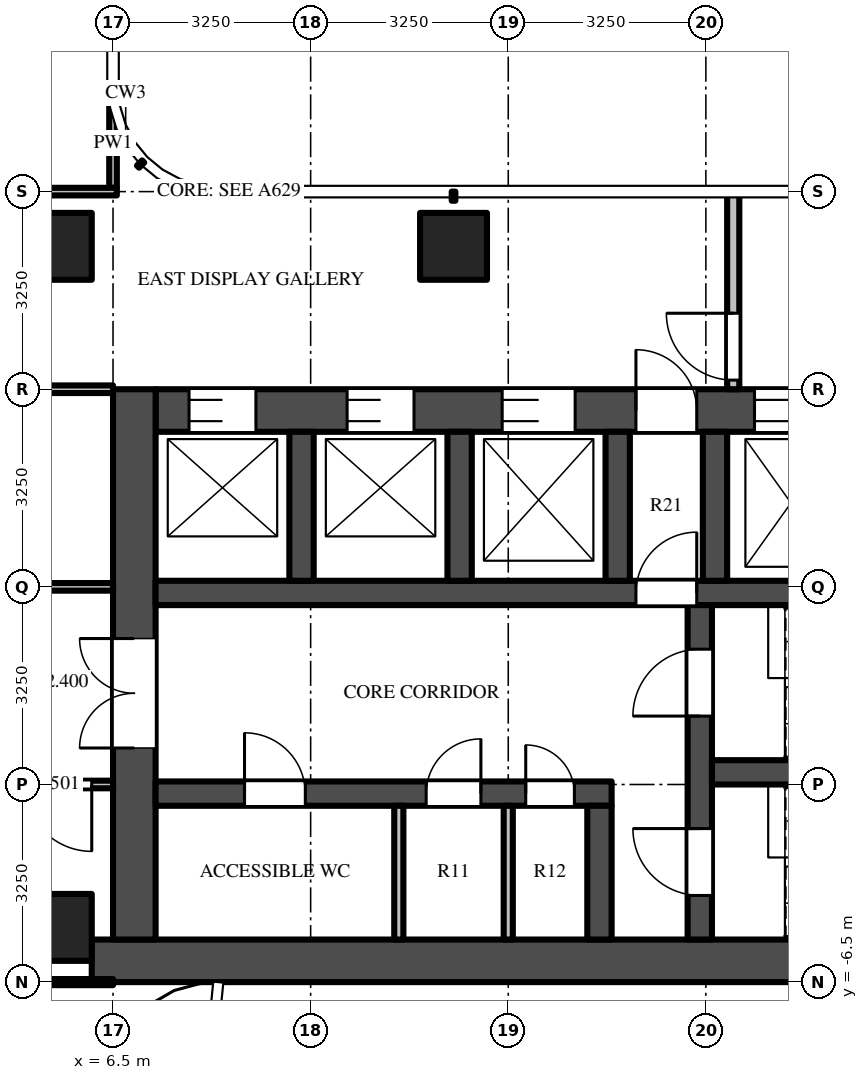
"""IFC4 building model, lengths in metres.
Left out: names, types, materials, properties, quantities, classifications, styles, units other than length and angle.
Written with IfcOpenShell. Run it as: python <this file> out.ifc"""

import sys

from ifc_helpers import new_model, si_unit, direction, frame, frame_2d, origin, origin_2d, place, context, subcontext, project, spatial, rectangle, extrude, source, transform, mapped, element, fill, save


model = new_model("IFC4")
c1 = context("Model", 3, precision=1e-05, world=origin(), true_north=direction((0.0, 1.0)))
c2 = subcontext(c1, "Body", "Model", "MODEL_VIEW")
j1 = project(units=[si_unit("LENGTHUNIT", "METRE"), si_unit("PLANEANGLEUNIT", "RADIAN")], contexts=[c1])
p1 = place(None, origin())
s1 = spatial("IfcSite", under=j1, at=p1, CompositionType="ELEMENT")
p2 = place(p1, origin())
s2 = spatial("IfcBuilding", under=s1, at=p2, CompositionType="ELEMENT")
p3 = place(p2, frame((0.0, 0.0, 232.4)))
s3 = spatial("IfcBuildingStorey", under=s2, at=p3, CompositionType="ELEMENT", Elevation=232.4)
m1 = source(origin(), c2, "Body", "SweptSolid", [
    extrude(rectangle(XDim=1.1, YDim=1.1, at=origin_2d()), origin(), (0.0, 0.0, 1.0), 3.9),
])
for number, where, z_axis, x_axis in (
    (1, (12.1, 5.6, 0.0), (0.0, 0.0, 1.0), (1.0, 0.0, 0.0)),
    (2, (5.6, 5.6, 0.0), (0.0, 0.0, 1.0), (1.0, 0.0, 0.0)),
    (3, (5.6, -5.6, 0.0), (0.0, 0.0, 1.0), (1.0, 0.0, 0.0)),
):
    element("IfcColumn", number, at=place(p3, frame(where, z_axis=z_axis, x_axis=x_axis)), inside=s3, PredefinedType="COLUMN", context=c2, shape_type="MappedRepresentation", body=[
        mapped(m1, transform((0.0, 0.0, 0.0))),
    ])
m2 = source(origin(), c2, "Body", "SweptSolid", [
    extrude(rectangle(XDim=16.6, YDim=0.7, at=frame_2d((8.3, 0.0))), origin(), (0.0, 0.0, 1.0), 3.7),
])
p4 = place(p3, frame((6.15, -6.15, 0.0), z_axis=(0.0, 0.0, 1.0), x_axis=(1.0, 0.0, 0.0)))
e4 = element("IfcWall", 4, at=p4, inside=s3, PredefinedType="SHEAR", context=c2, shape_type="MappedRepresentation", body=[
    mapped(m2, transform((0.0, 0.0, 0.0))),
])
m3 = source(origin(), c2, "Body", "SweptSolid", [
    extrude(rectangle(XDim=14.85, YDim=0.7, at=frame_2d((7.425, 0.0))), origin(), (0.0, 0.0, 1.0), 3.7),
])
p5 = place(p3, frame((7.2, 2.9, 0.0), z_axis=(0.0, 0.0, 1.0), x_axis=(1.0, 0.0, 0.0)))
e5 = element("IfcWall", 5, at=p5, inside=s3, PredefinedType="SHEAR", context=c2, shape_type="MappedRepresentation", body=[
    mapped(m3, transform((0.0, 0.0, 0.0))),
])
m4 = source(origin(), c2, "Body", "SweptSolid", [
    extrude(rectangle(XDim=1.1, YDim=2.1, at=frame_2d((0.55, 1.05))), frame((0.0, 0.36, 0.0), z_axis=(0.0, -1.0, 0.0), x_axis=(1.0, 0.0, 0.0)), (0.0, 0.0, 1.0), 0.72),
])
p6 = place(p5, frame((0.55, 0.0, 0.0)))
e6 = element("IfcOpeningElement", 6, at=p6, cuts=e5, PredefinedType="OPENING", context=c2, shape_type="MappedRepresentation", body=[
    mapped(m4, transform((0.0, 0.0, 0.0))),
])
p7 = place(p5, frame((3.15, 0.0, 0.0)))
e7 = element("IfcOpeningElement", 7, at=p7, cuts=e5, PredefinedType="OPENING", context=c2, shape_type="MappedRepresentation", body=[
    mapped(m4, transform((0.0, 0.0, 0.0))),
])
m5 = source(origin(), c2, "Body", "SweptSolid", [
    extrude(rectangle(XDim=1.2, YDim=2.1, at=frame_2d((0.6, 1.05))), frame((0.0, 0.36, 0.0), z_axis=(0.0, -1.0, 0.0), x_axis=(1.0, 0.0, 0.0)), (0.0, 0.0, 1.0), 0.72),
])
p8 = place(p5, frame((5.7, 0.0, 0.0)))
e8 = element("IfcOpeningElement", 8, at=p8, cuts=e5, PredefinedType="OPENING", context=c2, shape_type="MappedRepresentation", body=[
    mapped(m5, transform((0.0, 0.0, 0.0))),
])
m6 = source(origin(), c2, "Body", "SweptSolid", [
    extrude(rectangle(XDim=1.3, YDim=2.1, at=frame_2d((0.65, 1.05))), frame((0.0, 0.36, 0.0), z_axis=(0.0, -1.0, 0.0), x_axis=(1.0, 0.0, 0.0)), (0.0, 0.0, 1.0), 0.72),
])
p9 = place(p5, frame((12.2, 0.0, 0.0)))
e9 = element("IfcOpeningElement", 9, at=p9, cuts=e5, PredefinedType="OPENING", context=c2, shape_type="MappedRepresentation", body=[
    mapped(m6, transform((0.0, 0.0, 0.0))),
])
p10 = place(p5, frame((9.85, 0.0, 0.0)))
e10 = element("IfcOpeningElement", 10, at=p10, cuts=e5, PredefinedType="OPENING", context=c2, shape_type="MappedRepresentation", body=[
    mapped(m5, transform((0.0, 0.0, 0.0))),
])
m7 = source(origin(), c2, "Body", "SweptSolid", [
    extrude(rectangle(XDim=1.0, YDim=2.1, at=frame_2d((0.5, 1.05))), frame((0.0, 0.36, 0.0), z_axis=(0.0, -1.0, 0.0), x_axis=(1.0, 0.0, 0.0)), (0.0, 0.0, 1.0), 0.72),
])
p11 = place(p5, frame((7.9, 0.0, 0.0)))
e11 = element("IfcOpeningElement", 11, at=p11, cuts=e5, PredefinedType="OPENING", context=c2, shape_type="MappedRepresentation", body=[
    mapped(m7, transform((0.0, 0.0, 0.0))),
])
m8 = source(origin(), c2, "Body", "SweptSolid", [
    extrude(rectangle(XDim=9.05, YDim=0.7, at=frame_2d((4.525, 0.0))), origin(), (0.0, 0.0, 1.0), 3.7),
])
p12 = place(p3, frame((6.85, -5.8, 0.0), z_axis=(0.0, 0.0, 1.0), x_axis=(0.0, 1.0, 0.0)))
e12 = element("IfcWall", 12, at=p12, inside=s3, PredefinedType="SHEAR", context=c2, shape_type="MappedRepresentation", body=[
    mapped(m8, transform((0.0, 0.0, 0.0))),
])
m9 = source(origin(), c2, "Body", "SweptSolid", [
    extrude(rectangle(XDim=1.8, YDim=2.1, at=frame_2d((0.9, 1.05))), frame((0.0, 0.36, 0.0), z_axis=(0.0, -1.0, 0.0), x_axis=(1.0, 0.0, 0.0)), (0.0, 0.0, 1.0), 0.72),
])
p13 = place(p12, frame((3.15, 0.0, 0.0)))
e13 = element("IfcOpeningElement", 13, at=p13, cuts=e12, PredefinedType="OPENING", context=c2, shape_type="MappedRepresentation", body=[
    mapped(m9, transform((0.0, 0.0, 0.0))),
])
m10 = source(origin(), c2, "Body", "SweptSolid", [
    extrude(rectangle(XDim=7.5, YDim=0.4, at=frame_2d((3.75, 0.0))), origin(), (0.0, 0.0, 1.0), 3.7),
])
p14 = place(p3, frame((7.2, -3.4, 0.0), z_axis=(0.0, 0.0, 1.0), x_axis=(1.0, 0.0, 0.0)))
e14 = element("IfcWall", 14, at=p14, inside=s3, PredefinedType="SHEAR", context=c2, shape_type="MappedRepresentation", body=[
    mapped(m10, transform((0.0, 0.0, 0.0))),
])
m11 = source(origin(), c2, "Body", "SweptSolid", [
    extrude(rectangle(XDim=1.0, YDim=2.1, at=frame_2d((0.5, 1.05))), frame((0.0, 0.21, 0.0), z_axis=(0.0, -1.0, 0.0), x_axis=(1.0, 0.0, 0.0)), (0.0, 0.0, 1.0), 0.42),
])
p15 = place(p14, frame((1.462, 0.0, 0.0)))
e15 = element("IfcOpeningElement", 15, at=p15, cuts=e14, PredefinedType="OPENING", context=c2, shape_type="MappedRepresentation", body=[
    mapped(m11, transform((0.0, 0.0, 0.0))),
])
m12 = source(origin(), c2, "Body", "SweptSolid", [
    extrude(rectangle(XDim=0.9, YDim=2.1, at=frame_2d((0.45, 1.05))), frame((0.0, 0.21, 0.0), z_axis=(0.0, -1.0, 0.0), x_axis=(1.0, 0.0, 0.0)), (0.0, 0.0, 1.0), 0.42),
])
p16 = place(p14, frame((4.45, 0.0, 0.0)))
e16 = element("IfcOpeningElement", 16, at=p16, cuts=e14, PredefinedType="OPENING", context=c2, shape_type="MappedRepresentation", body=[
    mapped(m12, transform((0.0, 0.0, 0.0))),
])
m13 = source(origin(), c2, "Body", "SweptSolid", [
    extrude(rectangle(XDim=0.8, YDim=2.1, at=frame_2d((0.4, 1.05))), frame((0.0, 0.21, 0.0), z_axis=(0.0, -1.0, 0.0), x_axis=(1.0, 0.0, 0.0)), (0.0, 0.0, 1.0), 0.42),
])
p17 = place(p14, frame((6.087, 0.0, 0.0)))
e17 = element("IfcOpeningElement", 17, at=p17, cuts=e14, PredefinedType="OPENING", context=c2, shape_type="MappedRepresentation", body=[
    mapped(m13, transform((0.0, 0.0, 0.0))),
])
m14 = source(origin(), c2, "Body", "SweptSolid", [
    extrude(rectangle(XDim=14.85, YDim=0.4, at=frame_2d((7.425, 0.0))), origin(), (0.0, 0.0, 1.0), 3.7),
])
p18 = place(p3, frame((7.2, -0.1, 0.0), z_axis=(0.0, 0.0, 1.0), x_axis=(1.0, 0.0, 0.0)))
e18 = element("IfcWall", 18, at=p18, inside=s3, PredefinedType="SHEAR", context=c2, shape_type="MappedRepresentation", body=[
    mapped(m14, transform((0.0, 0.0, 0.0))),
])
p19 = place(p18, frame((7.9, 0.0, 0.0)))
e19 = element("IfcOpeningElement", 19, at=p19, cuts=e18, PredefinedType="OPENING", context=c2, shape_type="MappedRepresentation", body=[
    mapped(m11, transform((0.0, 0.0, 0.0))),
])
m15 = source(origin(), c2, "Body", "SweptSolid", [
    extrude(rectangle(XDim=5.5, YDim=0.4, at=frame_2d((2.75, 0.0))), origin(), (0.0, 0.0, 1.0), 3.7),
])
p20 = place(p3, frame((16.15, -5.8, 0.0), z_axis=(0.0, 0.0, 1.0), x_axis=(0.0, 1.0, 0.0)))
e20 = element("IfcWall", 20, at=p20, inside=s3, PredefinedType="SHEAR", context=c2, shape_type="MappedRepresentation", body=[
    mapped(m15, transform((0.0, 0.0, 0.0))),
])
m16 = source(origin(), c2, "Body", "SweptSolid", [
    extrude(rectangle(XDim=1.1, YDim=2.1, at=frame_2d((0.55, 1.05))), frame((0.0, 0.21, 0.0), z_axis=(0.0, -1.0, 0.0), x_axis=(1.0, 0.0, 0.0)), (0.0, 0.0, 1.0), 0.42),
])
p21 = place(p20, frame((0.725, 0.0, 0.0)))
e21 = element("IfcOpeningElement", 21, at=p21, cuts=e20, PredefinedType="OPENING", context=c2, shape_type="MappedRepresentation", body=[
    mapped(m16, transform((0.0, 0.0, 0.0))),
])
p22 = place(p20, frame((3.675, 0.0, 0.0)))
e22 = element("IfcOpeningElement", 22, at=p22, cuts=e20, PredefinedType="OPENING", context=c2, shape_type="MappedRepresentation", body=[
    mapped(m16, transform((0.0, 0.0, 0.0))),
])
m17 = source(origin(), c2, "Body", "SweptSolid", [
    extrude(rectangle(XDim=5.7, YDim=0.4, at=frame_2d((2.85, 0.0))), origin(), (0.0, 0.0, 1.0), 3.7),
])
p23 = place(p3, frame((16.35, -3.05, 0.0), z_axis=(0.0, 0.0, 1.0), x_axis=(1.0, 0.0, 0.0)))
e23 = element("IfcWall", 23, at=p23, inside=s3, PredefinedType="SHEAR", context=c2, shape_type="MappedRepresentation", body=[
    mapped(m17, transform((0.0, 0.0, 0.0))),
])
m18 = source(origin(), c2, "Body", "SweptSolid", [
    extrude(rectangle(XDim=2.2, YDim=0.4, at=frame_2d((1.1, 0.0))), origin(), (0.0, 0.0, 1.0), 3.7),
])
p24 = place(p3, frame((14.5, -5.8, 0.0), z_axis=(0.0, 0.0, 1.0), x_axis=(0.0, 1.0, 0.0)))
e24 = element("IfcWall", 24, at=p24, inside=s3, PredefinedType="SHEAR", context=c2, shape_type="MappedRepresentation", body=[
    mapped(m18, transform((0.0, 0.0, 0.0))),
])
m19 = source(origin(), c2, "Body", "SweptSolid", [
    extrude(rectangle(XDim=2.45, YDim=0.4, at=frame_2d((1.225, 0.0))), origin(), (0.0, 0.0, 1.0), 3.7),
])
for number, where, z_axis, x_axis in (
    (25, (9.6, 0.1, 0.0), (0.0, 0.0, 1.0), (0.0, 1.0, 0.0)),
    (26, (12.2, 0.1, 0.0), (0.0, 0.0, 1.0), (0.0, 1.0, 0.0)),
    (27, (14.8, 0.1, 0.0), (0.0, 0.0, 1.0), (0.0, 1.0, 0.0)),
    (28, (16.4, 0.1, 0.0), (0.0, 0.0, 1.0), (0.0, 1.0, 0.0)),
):
    element("IfcWall", number, at=place(p3, frame(where, z_axis=z_axis, x_axis=x_axis)), inside=s3, PredefinedType="SHEAR", context=c2, shape_type="MappedRepresentation", body=[
        mapped(m19, transform((0.0, 0.0, 0.0))),
    ])
m20 = source(origin(), c2, "Body", "SweptSolid", [
    extrude(rectangle(XDim=3.25, YDim=0.2, at=frame_2d((1.625, 0.0))), origin(), (0.0, 0.0, 1.0), 3.7),
])
p25 = place(p3, frame((16.7, 3.25, 0.0), z_axis=(0.0, 0.0, 1.0), x_axis=(0.0, 1.0, 0.0)))
e29 = element("IfcWall", 29, at=p25, inside=s3, PredefinedType="PARTITIONING", context=c2, shape_type="MappedRepresentation", body=[
    mapped(m20, transform((0.0, 0.0, 0.0))),
])
m21 = source(origin(), c2, "Body", "SweptSolid", [
    extrude(rectangle(XDim=1.1, YDim=2.1, at=frame_2d((0.55, 1.05))), frame((0.0, 0.11, 0.0), z_axis=(0.0, -1.0, 0.0), x_axis=(1.0, 0.0, 0.0)), (0.0, 0.0, 1.0), 0.22),
])
p26 = place(p25, frame((0.15, 0.0, 0.0)))
e30 = element("IfcOpeningElement", 30, at=p26, cuts=e29, PredefinedType="OPENING", context=c2, shape_type="MappedRepresentation", body=[
    mapped(m21, transform((0.0, 0.0, 0.0))),
])
m22 = source(origin(), c2, "Body", "SweptSolid", [
    extrude(rectangle(XDim=2.2, YDim=0.15, at=frame_2d((1.1, 0.0))), origin(), (0.0, 0.0, 1.0), 3.7),
])
for number, where, z_axis, x_axis in (
    (31, (11.2, -5.8, 0.0), (0.0, 0.0, 1.0), (0.0, 1.0, 0.0)),
    (32, (13.0, -5.8, 0.0), (0.0, 0.0, 1.0), (0.0, 1.0, 0.0)),
):
    element("IfcWall", number, at=place(p3, frame(where, z_axis=z_axis, x_axis=x_axis)), inside=s3, PredefinedType="PARTITIONING", context=c2, shape_type="MappedRepresentation", body=[
        mapped(m22, transform((0.0, 0.0, 0.0))),
    ])
m23 = source(origin(), c2, "Body", "SweptSolid", [
    extrude(rectangle(XDim=1.469, YDim=0.125, at=frame_2d((0.734, 0.0))), origin(), (0.0, 0.0, 1.0), 3.7),
])
p27 = place(p3, frame((6.5, 6.562, 0.0), z_axis=(0.0, 0.0, 1.0), x_axis=(0.0, 1.0, 0.0)))
e33 = element("IfcWall", 33, at=p27, inside=s3, PredefinedType="PARTITIONING", context=c2, shape_type="MappedRepresentation", body=[
    mapped(m23, transform((0.0, 0.0, 0.0))),
])
m24 = source(origin(), c2, "Body", "SweptSolid", [
    extrude(rectangle(XDim=5.363, YDim=0.1, at=frame_2d((2.681, 0.0))), origin(), (0.0, 0.0, 1.0), 2.78),
])
p28 = place(p3, frame((1.137, -6.5, 0.0), z_axis=(0.0, 0.0, 1.0), x_axis=(1.0, 0.0, 0.0)))
e34 = element("IfcWall", 34, at=p28, inside=s3, PredefinedType="PARTITIONING", context=c2, shape_type="MappedRepresentation", body=[
    mapped(m24, transform((0.0, 0.0, 0.0))),
])
m25 = source(origin(), c2, "Body", "SweptSolid", [
    extrude(rectangle(XDim=5.363, YDim=0.125, at=frame_2d((2.681, 0.0))), origin(), (0.0, 0.0, 1.0), 2.997),
])
p29 = place(p3, frame((6.5, -3.25, 0.0), z_axis=(0.0, 0.0, 1.0), x_axis=(-1.0, 0.0, 0.0)))
e35 = element("IfcWall", 35, at=p29, inside=s3, PredefinedType="PARTITIONING", context=c2, shape_type="MappedRepresentation", body=[
    mapped(m25, transform((0.0, 0.0, 0.0))),
])
m26 = source(origin(), c2, "Body", "SweptSolid", [
    extrude(rectangle(XDim=1.1, YDim=2.1, at=frame_2d((0.55, 1.05))), frame((0.0, 0.073, 0.0), z_axis=(0.0, -1.0, 0.0), x_axis=(1.0, 0.0, 0.0)), (0.0, 0.0, 1.0), 0.145),
])
p30 = place(p29, frame((0.35, 0.0, 0.0)))
e36 = element("IfcOpeningElement", 36, at=p30, cuts=e35, PredefinedType="OPENING", context=c2, shape_type="MappedRepresentation", body=[
    mapped(m26, transform((0.0, 0.0, 0.0))),
])
p31 = place(p3, frame((6.5, 0.0, 0.0), z_axis=(0.0, 0.0, 1.0), x_axis=(-1.0, 0.0, 0.0)))
e37 = element("IfcWall", 37, at=p31, inside=s3, PredefinedType="PARTITIONING", context=c2, shape_type="MappedRepresentation", body=[
    mapped(m25, transform((0.0, 0.0, 0.0))),
])
m27 = source(origin(), c2, "Body", "SweptSolid", [
    extrude(rectangle(XDim=1.0, YDim=2.1, at=frame_2d((0.5, 1.05))), frame((0.0, 0.073, 0.0), z_axis=(0.0, -1.0, 0.0), x_axis=(1.0, 0.0, 0.0)), (0.0, 0.0, 1.0), 0.145),
])
p32 = place(p31, frame((3.95, 0.0, 0.0)))
e38 = element("IfcOpeningElement", 38, at=p32, cuts=e37, PredefinedType="OPENING", context=c2, shape_type="MappedRepresentation", body=[
    mapped(m27, transform((0.0, 0.0, 0.0))),
])
p33 = place(p3, frame((1.137, 3.25, 0.0), z_axis=(0.0, 0.0, 1.0), x_axis=(1.0, 0.0, 0.0)))
e39 = element("IfcWall", 39, at=p33, inside=s3, PredefinedType="PARTITIONING", context=c2, shape_type="MappedRepresentation", body=[
    mapped(m25, transform((0.0, 0.0, 0.0))),
])
m28 = source(origin(), c2, "Body", "SweptSolid", [
    extrude(rectangle(XDim=3.725, YDim=0.125, at=frame_2d((1.863, 0.0))), origin(), (0.0, 0.0, 1.0), 2.78),
])
p34 = place(p3, frame((2.837, 6.5, 0.0), z_axis=(0.0, 0.0, 1.0), x_axis=(1.0, 0.0, 0.0)))
e40 = element("IfcWall", 40, at=p34, inside=s3, PredefinedType="PARTITIONING", context=c2, shape_type="MappedRepresentation", body=[
    mapped(m28, transform((0.0, 0.0, 0.0))),
])
m29 = source(origin(), c2, "Body", "SweptSolid", [
    extrude(rectangle(XDim=1.1, YDim=2.1, at=frame_2d((0.55, 1.05))), frame((0.0, -0.275, 0.0), z_axis=(0.0, -1.0, 0.0), x_axis=(1.0, 0.0, 0.0)), (0.0, 0.0, 1.0), 0.05),
])
p35 = place(p6, origin())
e41 = element("IfcDoor", 41, at=p35, inside=s3, OperationType="DOUBLE_DOOR_SLIDING", PredefinedType="DOOR", context=c2, shape_type="MappedRepresentation", body=[
    mapped(m29, transform((0.0, 0.0, 0.0))),
])
fill(e6, e41)
p36 = place(p7, origin())
e42 = element("IfcDoor", 42, at=p36, inside=s3, OperationType="DOUBLE_DOOR_SLIDING", PredefinedType="DOOR", context=c2, shape_type="MappedRepresentation", body=[
    mapped(m29, transform((0.0, 0.0, 0.0))),
])
fill(e7, e42)
m30 = source(origin(), c2, "Body", "SweptSolid", [
    extrude(rectangle(XDim=1.2, YDim=2.1, at=frame_2d((0.6, 1.05))), frame((0.0, -0.275, 0.0), z_axis=(0.0, -1.0, 0.0), x_axis=(1.0, 0.0, 0.0)), (0.0, 0.0, 1.0), 0.05),
])
p37 = place(p8, origin())
e43 = element("IfcDoor", 43, at=p37, inside=s3, OperationType="DOUBLE_DOOR_SLIDING", PredefinedType="DOOR", context=c2, shape_type="MappedRepresentation", body=[
    mapped(m30, transform((0.0, 0.0, 0.0))),
])
fill(e8, e43)
p38 = place(p10, origin())
e44 = element("IfcDoor", 44, at=p38, inside=s3, OperationType="DOUBLE_DOOR_SLIDING", PredefinedType="DOOR", context=c2, shape_type="MappedRepresentation", body=[
    mapped(m30, transform((0.0, 0.0, 0.0))),
])
fill(e10, e44)
m31 = source(origin(), c2, "Body", "SweptSolid", [
    extrude(rectangle(XDim=1.8, YDim=2.1, at=frame_2d((0.9, 1.05))), frame((0.0, -0.275, 0.0), z_axis=(0.0, -1.0, 0.0), x_axis=(1.0, 0.0, 0.0)), (0.0, 0.0, 1.0), 0.05),
])
p39 = place(p13, origin())
e45 = element("IfcDoor", 45, at=p39, inside=s3, OperationType="DOUBLE_DOOR_SINGLE_SWING", PredefinedType="DOOR", context=c2, shape_type="MappedRepresentation", body=[
    mapped(m31, transform((0.0, 0.0, 0.0))),
])
fill(e13, e45)
m32 = source(origin(), c2, "Body", "SweptSolid", [
    extrude(rectangle(XDim=1.1, YDim=2.1, at=frame_2d((0.55, 1.05))), frame((0.0, 0.025, 0.0), z_axis=(0.0, -1.0, 0.0), x_axis=(1.0, 0.0, 0.0)), (0.0, 0.0, 1.0), 0.05),
])
p40 = place(p21, origin())
e46 = element("IfcDoor", 46, at=p40, inside=s3, OperationType="SINGLE_SWING_RIGHT", PredefinedType="DOOR", context=c2, shape_type="MappedRepresentation", body=[
    mapped(m32, transform((0.0, 0.0, 0.0))),
])
fill(e21, e46)
p41 = place(p22, origin())
e47 = element("IfcDoor", 47, at=p41, inside=s3, OperationType="SINGLE_SWING_LEFT", PredefinedType="DOOR", context=c2, shape_type="MappedRepresentation", body=[
    mapped(m32, transform((0.0, 0.0, 0.0))),
])
fill(e22, e47)
m33 = source(origin(), c2, "Body", "SweptSolid", [
    extrude(rectangle(XDim=1.0, YDim=2.1, at=frame_2d((0.5, 1.05))), frame((0.0, 0.025, 0.0), z_axis=(0.0, -1.0, 0.0), x_axis=(1.0, 0.0, 0.0)), (0.0, 0.0, 1.0), 0.05),
])
p42 = place(p19, origin())
e48 = element("IfcDoor", 48, at=p42, inside=s3, OperationType="SINGLE_SWING_RIGHT", PredefinedType="DOOR", context=c2, shape_type="MappedRepresentation", body=[
    mapped(m33, transform((0.0, 0.0, 0.0))),
])
fill(e19, e48)
m34 = source(origin(), c2, "Body", "SweptSolid", [
    extrude(rectangle(XDim=1.0, YDim=2.1, at=frame_2d((0.5, 1.05))), frame((0.0, -0.275, 0.0), z_axis=(0.0, -1.0, 0.0), x_axis=(1.0, 0.0, 0.0)), (0.0, 0.0, 1.0), 0.05),
])
p43 = place(p11, origin())
e49 = element("IfcDoor", 49, at=p43, inside=s3, OperationType="SINGLE_SWING_LEFT", PredefinedType="DOOR", context=c2, shape_type="MappedRepresentation", body=[
    mapped(m34, transform((0.0, 0.0, 0.0))),
])
fill(e11, e49)
p44 = place(p26, origin())
e50 = element("IfcDoor", 50, at=p44, inside=s3, OperationType="SINGLE_SWING_RIGHT", PredefinedType="DOOR", context=c2, shape_type="MappedRepresentation", body=[
    mapped(m32, transform((0.0, 0.0, 0.0))),
])
fill(e30, e50)
p45 = place(p15, origin())
e51 = element("IfcDoor", 51, at=p45, inside=s3, OperationType="SINGLE_SWING_LEFT", PredefinedType="DOOR", context=c2, shape_type="MappedRepresentation", body=[
    mapped(m33, transform((0.0, 0.0, 0.0))),
])
fill(e15, e51)
m35 = source(origin(), c2, "Body", "SweptSolid", [
    extrude(rectangle(XDim=0.9, YDim=2.1, at=frame_2d((0.45, 1.05))), frame((0.0, 0.025, 0.0), z_axis=(0.0, -1.0, 0.0), x_axis=(1.0, 0.0, 0.0)), (0.0, 0.0, 1.0), 0.05),
])
p46 = place(p16, origin())
e52 = element("IfcDoor", 52, at=p46, inside=s3, OperationType="SINGLE_SWING_RIGHT", PredefinedType="DOOR", context=c2, shape_type="MappedRepresentation", body=[
    mapped(m35, transform((0.0, 0.0, 0.0))),
])
fill(e16, e52)
m36 = source(origin(), c2, "Body", "SweptSolid", [
    extrude(rectangle(XDim=0.8, YDim=2.1, at=frame_2d((0.4, 1.05))), frame((0.0, 0.025, 0.0), z_axis=(0.0, -1.0, 0.0), x_axis=(1.0, 0.0, 0.0)), (0.0, 0.0, 1.0), 0.05),
])
p47 = place(p17, origin())
e53 = element("IfcDoor", 53, at=p47, inside=s3, OperationType="SINGLE_SWING_LEFT", PredefinedType="DOOR", context=c2, shape_type="MappedRepresentation", body=[
    mapped(m36, transform((0.0, 0.0, 0.0))),
])
fill(e17, e53)
p48 = place(p30, origin())
e54 = element("IfcDoor", 54, at=p48, inside=s3, OperationType="SINGLE_SWING_LEFT", PredefinedType="DOOR", context=c2, shape_type="MappedRepresentation", body=[
    mapped(m32, transform((0.0, 0.0, 0.0))),
])
fill(e36, e54)
save(model, sys.argv[1])
